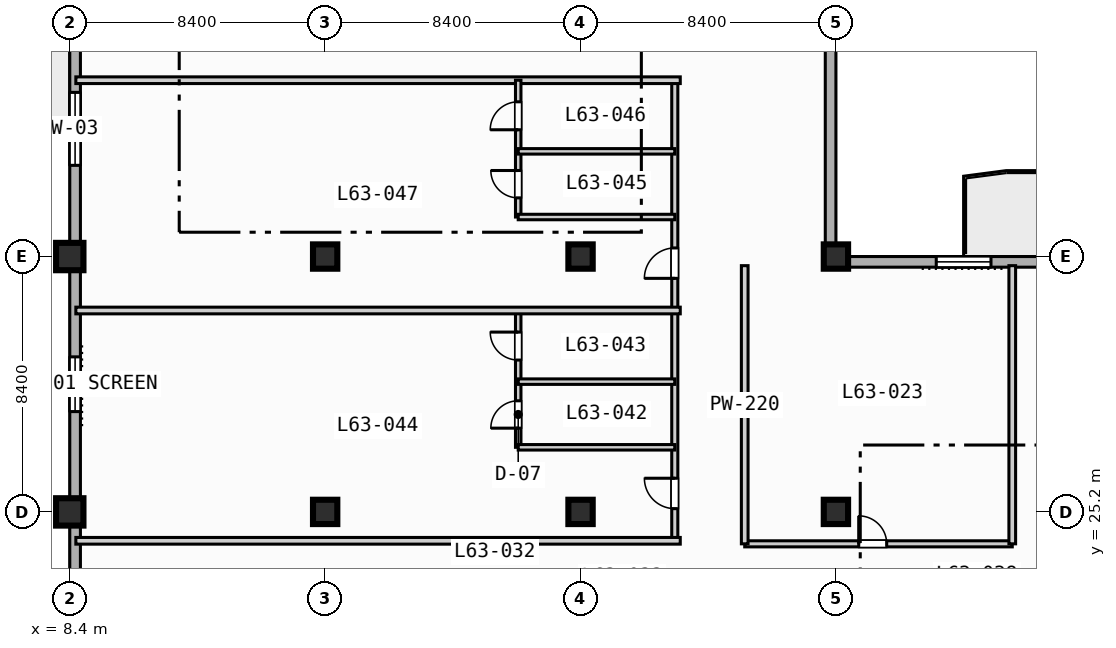
"""IFC4 building model, lengths in metres.
Left out: names, types, materials, properties, quantities, classifications, styles, units other than length and angle.
Written with IfcOpenShell. Run it as: python <this file> out.ifc"""

import sys

from ifc_helpers import new_model, si_unit, direction, frame, frame_2d, origin, origin_2d, place, context, subcontext, project, spatial, rectangle, extrude, element, fill, save


model = new_model("IFC4")
c1 = context("Model", 3, precision=1e-05, world=origin(), true_north=direction((0.0, 1.0)))
c2 = subcontext(c1, "Body", "Model", "MODEL_VIEW")
j1 = project(units=[si_unit("LENGTHUNIT", "METRE"), si_unit("PLANEANGLEUNIT", "RADIAN")], contexts=[c1])
p1 = place(None, origin())
s1 = spatial("IfcSite", under=j1, at=p1, CompositionType="ELEMENT")
p2 = place(p1, origin())
s2 = spatial("IfcBuilding", under=s1, at=p2, CompositionType="ELEMENT")
p3 = place(p2, frame((0.0, 0.0, 256.4)))
s3 = spatial("IfcBuildingStorey", under=s2, at=p3, CompositionType="ELEMENT", Elevation=256.4)
for number, where, z_axis, x_axis in (
    (1, (8.4, 25.2, 0.0), (0.0, 0.0, 1.0), (1.0, 0.0, 0.0)),
    (2, (8.4, 33.6, 0.0), (0.0, 0.0, 1.0), (1.0, 0.0, 0.0)),
):
    element("IfcColumn", number, at=place(p3, frame(where, z_axis=z_axis, x_axis=x_axis)), inside=s3, PredefinedType="COLUMN", context=c2, shape_type="SweptSolid", body=[
        extrude(rectangle(XDim=0.9, YDim=0.9, at=origin_2d()), origin(), (0.0, 0.0, 1.0), 3.7),
    ])
for number, where, z_axis, x_axis in (
    (3, (16.8, 25.2, 0.0), (0.0, 0.0, 1.0), (1.0, 0.0, 0.0)),
    (4, (16.8, 33.6, 0.0), (0.0, 0.0, 1.0), (1.0, 0.0, 0.0)),
    (5, (25.2, 25.2, 0.0), (0.0, 0.0, 1.0), (1.0, 0.0, 0.0)),
    (6, (25.2, 33.6, 0.0), (0.0, 0.0, 1.0), (1.0, 0.0, 0.0)),
    (7, (33.6, 25.2, 0.0), (0.0, 0.0, 1.0), (1.0, 0.0, 0.0)),
    (8, (33.6, 33.6, 0.0), (0.0, 0.0, 1.0), (1.0, 0.0, 0.0)),
):
    element("IfcColumn", number, at=place(p3, frame(where, z_axis=z_axis, x_axis=x_axis)), inside=s3, PredefinedType="COLUMN", context=c2, shape_type="SweptSolid", body=[
        extrude(rectangle(XDim=0.8, YDim=0.8, at=origin_2d()), origin(), (0.0, 0.0, 1.0), 3.7),
    ])
p4 = place(p3, frame((8.575, 11.575, 0.0), z_axis=(0.0, 0.0, 1.0), x_axis=(0.0, 1.0, 0.0)))
e9 = element("IfcWall", 9, at=p4, inside=s3, PredefinedType="STANDARD", context=c2, shape_type="SweptSolid", body=[
    extrude(rectangle(XDim=60.85, YDim=0.35, at=frame_2d((30.425, 0.0))), origin(), (0.0, 0.0, 1.0), 3.47),
])
p5 = place(p4, frame((33.925, 0.0, 0.0)))
e10 = element("IfcOpeningElement", 10, at=p5, cuts=e9, PredefinedType="OPENING", context=c2, shape_type="SweptSolid", body=[
    extrude(rectangle(XDim=1.4, YDim=2.2, at=frame_2d((0.7, 1.1))), frame((0.0, 0.185, 0.0), z_axis=(0.0, -1.0, 0.0), x_axis=(1.0, 0.0, 0.0)), (0.0, 0.0, 1.0), 0.37),
])
p6 = place(p4, frame((16.925, 0.0, 0.85)))
e11 = element("IfcOpeningElement", 11, at=p6, cuts=e9, PredefinedType="OPENING", context=c2, shape_type="SweptSolid", body=[
    extrude(rectangle(XDim=1.8, YDim=1.8, at=frame_2d((0.9, 0.9))), frame((0.0, 0.185, 0.0), z_axis=(0.0, -1.0, 0.0), x_axis=(1.0, 0.0, 0.0)), (0.0, 0.0, 1.0), 0.37),
])
p7 = place(p4, frame((25.025, 0.0, 0.85)))
e12 = element("IfcOpeningElement", 12, at=p7, cuts=e9, PredefinedType="OPENING", context=c2, shape_type="SweptSolid", body=[
    extrude(rectangle(XDim=2.4, YDim=1.95, at=frame_2d((1.2, 0.975))), frame((0.0, 0.185, 0.0), z_axis=(0.0, -1.0, 0.0), x_axis=(1.0, 0.0, 0.0)), (0.0, 0.0, 1.0), 0.37),
])
p8 = place(p4, frame((41.825, 0.0, 0.85)))
e13 = element("IfcOpeningElement", 13, at=p8, cuts=e9, PredefinedType="OPENING", context=c2, shape_type="SweptSolid", body=[
    extrude(rectangle(XDim=2.4, YDim=1.95, at=frame_2d((1.2, 0.975))), frame((0.0, 0.185, 0.0), z_axis=(0.0, -1.0, 0.0), x_axis=(1.0, 0.0, 0.0)), (0.0, 0.0, 1.0), 0.37),
])
p9 = place(p3, frame((33.425, 72.425, 0.0), z_axis=(0.0, 0.0, 1.0), x_axis=(0.0, -1.0, 0.0)))
e14 = element("IfcWall", 14, at=p9, inside=s3, PredefinedType="STANDARD", context=c2, shape_type="SweptSolid", body=[
    extrude(rectangle(XDim=39.0, YDim=0.35, at=frame_2d((19.5, 0.0))), origin(), (0.0, 0.0, 1.0), 3.47),
])
p10 = place(p9, frame((5.9, 0.0, 0.85)))
e15 = element("IfcOpeningElement", 15, at=p10, cuts=e14, PredefinedType="OPENING", context=c2, shape_type="SweptSolid", body=[
    extrude(rectangle(XDim=1.8, YDim=1.8, at=frame_2d((0.9, 0.9))), frame((0.0, 0.185, 0.0), z_axis=(0.0, -1.0, 0.0), x_axis=(1.0, 0.0, 0.0)), (0.0, 0.0, 1.0), 0.37),
])
p11 = place(p3, frame((33.425, 33.425, 0.0), z_axis=(0.0, 0.0, 1.0), x_axis=(1.0, 0.0, 0.0)))
e16 = element("IfcWall", 16, at=p11, inside=s3, PredefinedType="STANDARD", context=c2, shape_type="SweptSolid", body=[
    extrude(rectangle(XDim=39.0, YDim=0.35, at=frame_2d((19.5, 0.0))), origin(), (0.0, 0.0, 1.0), 3.47),
])
p12 = place(p11, frame((12.075, 0.0, 0.0)))
e17 = element("IfcOpeningElement", 17, at=p12, cuts=e16, PredefinedType="OPENING", context=c2, shape_type="SweptSolid", body=[
    extrude(rectangle(XDim=1.4, YDim=2.2, at=frame_2d((0.7, 1.1))), frame((0.0, 0.185, 0.0), z_axis=(0.0, -1.0, 0.0), x_axis=(1.0, 0.0, 0.0)), (0.0, 0.0, 1.0), 0.37),
])
p13 = place(p11, frame((3.475, 0.0, 0.85)))
e18 = element("IfcOpeningElement", 18, at=p13, cuts=e16, PredefinedType="OPENING", context=c2, shape_type="SweptSolid", body=[
    extrude(rectangle(XDim=1.8, YDim=1.8, at=frame_2d((0.9, 0.9))), frame((0.0, 0.185, 0.0), z_axis=(0.0, -1.0, 0.0), x_axis=(1.0, 0.0, 0.0)), (0.0, 0.0, 1.0), 0.37),
])
p14 = place(p3, frame((30.6, 24.15, 0.0), z_axis=(0.0, 0.0, 1.0), x_axis=(1.0, 0.0, 0.0)))
e19 = element("IfcWall", 19, at=p14, inside=s3, PredefinedType="PARTITIONING", context=c2, shape_type="SweptSolid", body=[
    extrude(rectangle(XDim=8.8, YDim=0.2, at=frame_2d((4.4, 0.0))), origin(), (0.0, 0.0, 1.0), 3.47),
])
p15 = place(p14, frame((3.75, 0.0, 0.0)))
e20 = element("IfcOpeningElement", 20, at=p15, cuts=e19, PredefinedType="OPENING", context=c2, shape_type="SweptSolid", body=[
    extrude(rectangle(XDim=0.92, YDim=2.1, at=frame_2d((0.46, 1.05))), frame((0.0, 0.11, 0.0), z_axis=(0.0, -1.0, 0.0), x_axis=(1.0, 0.0, 0.0)), (0.0, 0.0, 1.0), 0.22),
])
for number, where, z_axis, x_axis in (
    (21, (30.6, 24.15, 0.0), (0.0, 0.0, 1.0), (0.0, 1.0, 0.0)),
    (22, (39.4, 24.15, 0.0), (0.0, 0.0, 1.0), (0.0, 1.0, 0.0)),
):
    element("IfcWall", number, at=place(p3, frame(where, z_axis=z_axis, x_axis=x_axis)), inside=s3, PredefinedType="PARTITIONING", context=c2, shape_type="SweptSolid", body=[
        extrude(rectangle(XDim=9.15, YDim=0.22, at=frame_2d((4.575, 0.0))), origin(), (0.0, 0.0, 1.0), 3.47),
    ])
p16 = place(p3, frame((28.3, 24.25, 0.0), z_axis=(0.0, 0.0, 1.0), x_axis=(0.0, 1.0, 0.0)))
e23 = element("IfcWall", 23, at=p16, inside=s3, PredefinedType="PARTITIONING", context=c2, shape_type="SweptSolid", body=[
    extrude(rectangle(XDim=15.15, YDim=0.2, at=frame_2d((7.575, 0.0))), origin(), (0.0, 0.0, 1.0), 3.47),
])
p17 = place(p16, frame((1.058, 0.0, 0.0)))
e24 = element("IfcOpeningElement", 24, at=p17, cuts=e23, PredefinedType="OPENING", context=c2, shape_type="SweptSolid", body=[
    extrude(rectangle(XDim=1.0, YDim=2.15, at=frame_2d((0.5, 1.075))), frame((0.0, 0.11, 0.0), z_axis=(0.0, -1.0, 0.0), x_axis=(1.0, 0.0, 0.0)), (0.0, 0.0, 1.0), 0.22),
])
p18 = place(p16, frame((8.633, 0.0, 0.0)))
e25 = element("IfcOpeningElement", 25, at=p18, cuts=e23, PredefinedType="OPENING", context=c2, shape_type="SweptSolid", body=[
    extrude(rectangle(XDim=1.0, YDim=2.15, at=frame_2d((0.5, 1.075))), frame((0.0, 0.11, 0.0), z_axis=(0.0, -1.0, 0.0), x_axis=(1.0, 0.0, 0.0)), (0.0, 0.0, 1.0), 0.22),
])
p19 = place(p3, frame((8.6, 24.25, 0.0), z_axis=(0.0, 0.0, 1.0), x_axis=(1.0, 0.0, 0.0)))
e26 = element("IfcWall", 26, at=p19, inside=s3, PredefinedType="PARTITIONING", context=c2, shape_type="SweptSolid", body=[
    extrude(rectangle(XDim=19.88, YDim=0.22, at=frame_2d((9.94, 0.0))), origin(), (0.0, 0.0, 1.0), 3.47),
])
p20 = place(p3, frame((23.15, 27.325, 0.0), z_axis=(0.0, 0.0, 1.0), x_axis=(0.0, 1.0, 0.0)))
e27 = element("IfcWall", 27, at=p20, inside=s3, PredefinedType="PLUMBINGWALL", context=c2, shape_type="SweptSolid", body=[
    extrude(rectangle(XDim=4.5, YDim=0.18, at=frame_2d((2.25, 0.0))), origin(), (0.0, 0.0, 1.0), 3.47),
])
p21 = place(p20, frame((0.63, 0.0, 0.0)))
e28 = element("IfcOpeningElement", 28, at=p21, cuts=e27, PredefinedType="OPENING", context=c2, shape_type="SweptSolid", body=[
    extrude(rectangle(XDim=0.9, YDim=2.1, at=frame_2d((0.45, 1.05))), frame((0.0, 0.1, 0.0), z_axis=(0.0, -1.0, 0.0), x_axis=(1.0, 0.0, 0.0)), (0.0, 0.0, 1.0), 0.2),
])
p22 = place(p20, frame((2.87, 0.0, 0.0)))
e29 = element("IfcOpeningElement", 29, at=p22, cuts=e27, PredefinedType="OPENING", context=c2, shape_type="SweptSolid", body=[
    extrude(rectangle(XDim=0.92, YDim=2.1, at=frame_2d((0.46, 1.05))), frame((0.0, 0.1, 0.0), z_axis=(0.0, -1.0, 0.0), x_axis=(1.0, 0.0, 0.0)), (0.0, 0.0, 1.0), 0.2),
])
for number, where, z_axis, x_axis in (
    (30, (23.15, 27.325, 0.0), (0.0, 0.0, 1.0), (1.0, 0.0, 0.0)),
    (31, (23.15, 29.485, 0.0), (0.0, 0.0, 1.0), (1.0, 0.0, 0.0)),
):
    element("IfcWall", number, at=place(p3, frame(where, z_axis=z_axis, x_axis=x_axis)), inside=s3, PredefinedType="PLUMBINGWALL", context=c2, shape_type="SweptSolid", body=[
        extrude(rectangle(XDim=5.15, YDim=0.18, at=frame_2d((2.575, 0.0))), origin(), (0.0, 0.0, 1.0), 3.47),
    ])
for number, where, z_axis, x_axis in (
    (32, (8.6, 31.825, 0.0), (0.0, 0.0, 1.0), (1.0, 0.0, 0.0)),
    (33, (8.6, 39.4, 0.0), (0.0, 0.0, 1.0), (1.0, 0.0, 0.0)),
):
    element("IfcWall", number, at=place(p3, frame(where, z_axis=z_axis, x_axis=x_axis)), inside=s3, PredefinedType="PARTITIONING", context=c2, shape_type="SweptSolid", body=[
        extrude(rectangle(XDim=19.88, YDim=0.22, at=frame_2d((9.94, 0.0))), origin(), (0.0, 0.0, 1.0), 3.47),
    ])
p23 = place(p3, frame((23.15, 34.9, 0.0), z_axis=(0.0, 0.0, 1.0), x_axis=(0.0, 1.0, 0.0)))
e34 = element("IfcWall", 34, at=p23, inside=s3, PredefinedType="PLUMBINGWALL", context=c2, shape_type="SweptSolid", body=[
    extrude(rectangle(XDim=4.5, YDim=0.18, at=frame_2d((2.25, 0.0))), origin(), (0.0, 0.0, 1.0), 3.47),
])
p24 = place(p23, frame((0.63, 0.0, 0.0)))
e35 = element("IfcOpeningElement", 35, at=p24, cuts=e34, PredefinedType="OPENING", context=c2, shape_type="SweptSolid", body=[
    extrude(rectangle(XDim=0.9, YDim=2.1, at=frame_2d((0.45, 1.05))), frame((0.0, 0.1, 0.0), z_axis=(0.0, -1.0, 0.0), x_axis=(1.0, 0.0, 0.0)), (0.0, 0.0, 1.0), 0.2),
])
p25 = place(p23, frame((2.87, 0.0, 0.0)))
e36 = element("IfcOpeningElement", 36, at=p25, cuts=e34, PredefinedType="OPENING", context=c2, shape_type="SweptSolid", body=[
    extrude(rectangle(XDim=0.92, YDim=2.1, at=frame_2d((0.46, 1.05))), frame((0.0, 0.1, 0.0), z_axis=(0.0, -1.0, 0.0), x_axis=(1.0, 0.0, 0.0)), (0.0, 0.0, 1.0), 0.2),
])
for number, where, z_axis, x_axis in (
    (37, (23.15, 34.9, 0.0), (0.0, 0.0, 1.0), (1.0, 0.0, 0.0)),
    (38, (23.15, 37.06, 0.0), (0.0, 0.0, 1.0), (1.0, 0.0, 0.0)),
):
    element("IfcWall", number, at=place(p3, frame(where, z_axis=z_axis, x_axis=x_axis)), inside=s3, PredefinedType="PLUMBINGWALL", context=c2, shape_type="SweptSolid", body=[
        extrude(rectangle(XDim=5.15, YDim=0.18, at=frame_2d((2.575, 0.0))), origin(), (0.0, 0.0, 1.0), 3.47),
    ])
p26 = place(p6, origin())
e39 = element("IfcWindow", 39, at=p26, inside=s3, PartitioningType="SINGLE_PANEL", PredefinedType="WINDOW", context=c2, shape_type="SweptSolid", body=[
    extrude(rectangle(XDim=1.8, YDim=1.8, at=frame_2d((0.9, 0.9))), frame((0.0, 0.03, 0.0), z_axis=(0.0, -1.0, 0.0), x_axis=(1.0, 0.0, 0.0)), (0.0, 0.0, 1.0), 0.06),
])
fill(e11, e39)
p27 = place(p7, origin())
e40 = element("IfcWindow", 40, at=p27, inside=s3, PartitioningType="SINGLE_PANEL", PredefinedType="WINDOW", context=c2, shape_type="SweptSolid", body=[
    extrude(rectangle(XDim=2.4, YDim=1.95, at=frame_2d((1.2, 0.975))), frame((0.0, 0.03, 0.0), z_axis=(0.0, -1.0, 0.0), x_axis=(1.0, 0.0, 0.0)), (0.0, 0.0, 1.0), 0.06),
])
fill(e12, e40)
p28 = place(p13, origin())
e41 = element("IfcWindow", 41, at=p28, inside=s3, PartitioningType="SINGLE_PANEL", PredefinedType="WINDOW", context=c2, shape_type="SweptSolid", body=[
    extrude(rectangle(XDim=1.8, YDim=1.8, at=frame_2d((0.9, 0.9))), frame((0.0, 0.03, 0.0), z_axis=(0.0, -1.0, 0.0), x_axis=(1.0, 0.0, 0.0)), (0.0, 0.0, 1.0), 0.06),
])
fill(e18, e41)
p29 = place(p15, origin())
e42 = element("IfcDoor", 42, at=p29, inside=s3, OperationType="SINGLE_SWING_LEFT", PredefinedType="DOOR", context=c2, shape_type="SweptSolid", body=[
    extrude(rectangle(XDim=0.92, YDim=2.1, at=frame_2d((0.46, 1.05))), frame((0.0, 0.025, 0.0), z_axis=(0.0, -1.0, 0.0), x_axis=(1.0, 0.0, 0.0)), (0.0, 0.0, 1.0), 0.05),
])
fill(e20, e42)
p30 = place(p17, origin())
e43 = element("IfcDoor", 43, at=p30, inside=s3, OperationType="SINGLE_SWING_RIGHT", PredefinedType="DOOR", context=c2, shape_type="SweptSolid", body=[
    extrude(rectangle(XDim=1.0, YDim=2.15, at=frame_2d((0.5, 1.075))), frame((0.0, 0.025, 0.0), z_axis=(0.0, -1.0, 0.0), x_axis=(1.0, 0.0, 0.0)), (0.0, 0.0, 1.0), 0.05),
])
fill(e24, e43)
p31 = place(p18, origin())
e44 = element("IfcDoor", 44, at=p31, inside=s3, OperationType="SINGLE_SWING_LEFT", PredefinedType="DOOR", context=c2, shape_type="SweptSolid", body=[
    extrude(rectangle(XDim=1.0, YDim=2.15, at=frame_2d((0.5, 1.075))), frame((0.0, 0.025, 0.0), z_axis=(0.0, -1.0, 0.0), x_axis=(1.0, 0.0, 0.0)), (0.0, 0.0, 1.0), 0.05),
])
fill(e25, e44)
p32 = place(p21, origin())
e45 = element("IfcDoor", 45, at=p32, inside=s3, OperationType="SINGLE_SWING_LEFT", PredefinedType="DOOR", context=c2, shape_type="SweptSolid", body=[
    extrude(rectangle(XDim=0.9, YDim=2.1, at=frame_2d((0.45, 1.05))), frame((0.0, 0.025, 0.0), z_axis=(0.0, -1.0, 0.0), x_axis=(1.0, 0.0, 0.0)), (0.0, 0.0, 1.0), 0.05),
])
fill(e28, e45)
p33 = place(p22, origin())
e46 = element("IfcDoor", 46, at=p33, inside=s3, OperationType="SINGLE_SWING_RIGHT", PredefinedType="DOOR", context=c2, shape_type="SweptSolid", body=[
    extrude(rectangle(XDim=0.92, YDim=2.1, at=frame_2d((0.46, 1.05))), frame((0.0, 0.025, 0.0), z_axis=(0.0, -1.0, 0.0), x_axis=(1.0, 0.0, 0.0)), (0.0, 0.0, 1.0), 0.05),
])
fill(e29, e46)
p34 = place(p24, origin())
e47 = element("IfcDoor", 47, at=p34, inside=s3, OperationType="SINGLE_SWING_RIGHT", PredefinedType="DOOR", context=c2, shape_type="SweptSolid", body=[
    extrude(rectangle(XDim=0.9, YDim=2.1, at=frame_2d((0.45, 1.05))), frame((0.0, 0.025, 0.0), z_axis=(0.0, -1.0, 0.0), x_axis=(1.0, 0.0, 0.0)), (0.0, 0.0, 1.0), 0.05),
])
fill(e35, e47)
p35 = place(p25, origin())
e48 = element("IfcDoor", 48, at=p35, inside=s3, OperationType="SINGLE_SWING_LEFT", PredefinedType="DOOR", context=c2, shape_type="SweptSolid", body=[
    extrude(rectangle(XDim=0.92, YDim=2.1, at=frame_2d((0.46, 1.05))), frame((0.0, 0.025, 0.0), z_axis=(0.0, -1.0, 0.0), x_axis=(1.0, 0.0, 0.0)), (0.0, 0.0, 1.0), 0.05),
])
fill(e36, e48)
save(model, sys.argv[1])
